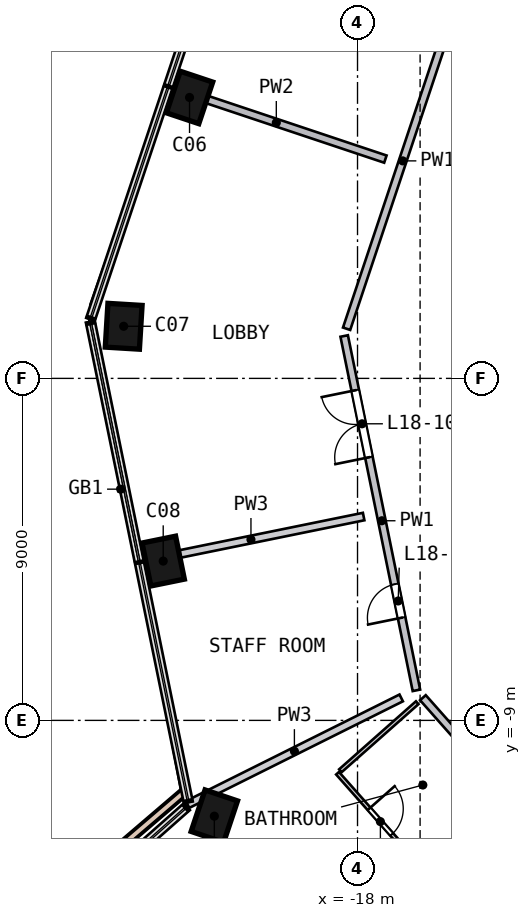
"""IFC4 building model, lengths in metres.
Left out: names, types, materials, properties, quantities, classifications, styles, units other than length and angle.
Written with IfcOpenShell. Run it as: python <this file> out.ifc"""

import sys

from ifc_helpers import new_model, si_unit, direction, frame, frame_2d, origin, origin_2d, place, context, subcontext, project, spatial, rectangle, extrude, element, fill, save


model = new_model("IFC4")
c1 = context("Model", 3, precision=1e-05, world=origin(), true_north=direction((0.0, 1.0)))
c2 = subcontext(c1, "Body", "Model", "MODEL_VIEW")
j1 = project(units=[si_unit("LENGTHUNIT", "METRE"), si_unit("PLANEANGLEUNIT", "RADIAN")], contexts=[c1])
p1 = place(None, origin())
s1 = spatial("IfcSite", under=j1, at=p1, CompositionType="ELEMENT")
p2 = place(p1, origin())
s2 = spatial("IfcBuilding", under=s1, at=p2, CompositionType="ELEMENT")
p3 = place(p2, frame((0.0, 0.0, 81.0)))
s3 = spatial("IfcBuildingStorey", under=s2, at=p3, CompositionType="ELEMENT", Elevation=81.0)
p4 = place(p3, frame((-22.391, 7.483, 0.0), z_axis=(-0.024338376, -0.074987109, 0.996887444), x_axis=(-0.31573538, -0.945566595, -0.07883517)))
e1 = element("IfcColumn", 1, at=p4, inside=s3, PredefinedType="COLUMN", context=c2, shape_type="SweptSolid", body=[
    extrude(rectangle(XDim=1.15, YDim=0.9, at=origin_2d()), origin(), (0.0, 0.0, 1.0), 4.705),
])
p5 = place(p3, frame((-24.148, 1.469, 0.0), z_axis=(-0.00420277, -0.080682803, 0.996730968), x_axis=(0.060241647, 0.994909055, 0.080789336)))
e2 = element("IfcColumn", 2, at=p5, inside=s3, PredefinedType="COLUMN", context=c2, shape_type="SweptSolid", body=[
    extrude(rectangle(XDim=1.15, YDim=0.9, at=origin_2d()), origin(), (0.0, 0.0, 1.0), 4.705),
])
p6 = place(p3, frame((-23.133, -4.715, 0.0), z_axis=(0.016398563, -0.077114764, 0.996887356), x_axis=(0.19912584, -0.976797696, -0.078836291)))
e3 = element("IfcColumn", 3, at=p6, inside=s3, PredefinedType="COLUMN", context=c2, shape_type="SweptSolid", body=[
    extrude(rectangle(XDim=1.15, YDim=0.9, at=origin_2d()), origin(), (0.0, 0.0, 1.0), 4.705),
])
p7 = place(p3, frame((-21.814, -11.433, 0.0), z_axis=(0.038806098, -0.072527974, 0.996611148), x_axis=(0.319522533, 0.94589897, 0.056395831)))
e4 = element("IfcColumn", 4, at=p7, inside=s3, PredefinedType="COLUMN", context=c2, shape_type="SweptSolid", body=[
    extrude(rectangle(XDim=1.15, YDim=0.9, at=origin_2d()), origin(), (0.0, 0.0, 1.0), 4.706),
])
p8 = place(p3, frame((-22.553, -10.879, 0.0), z_axis=(0.0, 0.0, 1.0), x_axis=(-0.759731275, -0.65023718, 0.0)))
e5 = element("IfcWall", 5, at=p8, inside=s3, PredefinedType="PARAPET", context=c2, shape_type="SweptSolid", body=[
    extrude(rectangle(XDim=8.419, YDim=0.2, at=frame_2d((4.21, 0.0))), origin(), (0.0, 0.0, 1.0), 1.1),
])
p9 = place(p3, frame((-29.293, -24.465, 0.0), z_axis=(0.0, 0.0, 1.0), x_axis=(0.74872671, 0.662878808, 0.0)))
e6 = element("IfcWall", 6, at=p9, inside=s3, PredefinedType="SOLIDWALL", context=c2, shape_type="SweptSolid", body=[
    extrude(rectangle(XDim=20.191, YDim=0.2, at=frame_2d((10.096, 0.0))), origin(), (0.0, 0.0, 1.0), 4.69),
])
p10 = place(p9, frame((11.65, 0.0, 0.0)))
e7 = element("IfcOpeningElement", 7, at=p10, cuts=e6, PredefinedType="OPENING", context=c2, shape_type="SweptSolid", body=[
    extrude(rectangle(XDim=1.0, YDim=2.1, at=frame_2d((0.5, 1.05))), frame((0.0, 0.11, 0.0), z_axis=(0.0, -1.0, 0.0), x_axis=(1.0, 0.0, 0.0)), (0.0, 0.0, 1.0), 0.22),
])
p11 = place(p3, frame((-16.45, -8.209, 0.0), z_axis=(0.0, 0.0, 1.0), x_axis=(-0.199726278, 0.979851731, 0.0)))
e8 = element("IfcWall", 8, at=p11, inside=s3, PredefinedType="SOLIDWALL", context=c2, shape_type="SweptSolid", body=[
    extrude(rectangle(XDim=9.516, YDim=0.2, at=frame_2d((4.758, 0.0))), origin(), (0.0, 0.0, 1.0), 4.69),
])
p12 = place(p11, frame((6.258, 0.0, 0.0)))
e9 = element("IfcOpeningElement", 9, at=p12, cuts=e8, PredefinedType="OPENING", context=c2, shape_type="SweptSolid", body=[
    extrude(rectangle(XDim=1.8, YDim=2.1, at=frame_2d((0.9, 1.05))), frame((0.0, 0.11, 0.0), z_axis=(0.0, -1.0, 0.0), x_axis=(1.0, 0.0, 0.0)), (0.0, 0.0, 1.0), 0.22),
])
p13 = place(p11, frame((1.95, 0.0, 0.0)))
e10 = element("IfcOpeningElement", 10, at=p13, cuts=e8, PredefinedType="OPENING", context=c2, shape_type="SweptSolid", body=[
    extrude(rectangle(XDim=0.9, YDim=2.1, at=frame_2d((0.45, 1.05))), frame((0.0, 0.11, 0.0), z_axis=(0.0, -1.0, 0.0), x_axis=(1.0, 0.0, 0.0)), (0.0, 0.0, 1.0), 0.22),
])
p14 = place(p3, frame((-15.334, 10.141, 0.0), z_axis=(0.0, 0.0, 1.0), x_axis=(-0.316982448, -0.948431404, 0.0)))
e11 = element("IfcWall", 11, at=p14, inside=s3, PredefinedType="SOLIDWALL", context=c2, shape_type="SweptSolid", body=[
    extrude(rectangle(XDim=9.316, YDim=0.2, at=frame_2d((4.658, 0.0))), origin(), (0.0, 0.0, 1.0), 4.69),
])
p15 = place(p3, frame((-16.279, -8.402, 0.0), z_axis=(0.0, 0.0, 1.0), x_axis=(0.66286047, -0.748742945, 0.0)))
e12 = element("IfcWall", 12, at=p15, inside=s3, PredefinedType="SOLIDWALL", context=c2, shape_type="SweptSolid", body=[
    extrude(rectangle(XDim=3.4, YDim=0.2, at=frame_2d((1.7, 0.0))), origin(), (0.0, 0.0, 1.0), 4.69),
])
p16 = place(p3, frame((-17.267, 5.771, 0.0), z_axis=(0.0, 0.0, 1.0), x_axis=(-0.948436957, 0.316965832, 0.0)))
e13 = element("IfcWall", 13, at=p16, inside=s3, PredefinedType="SOLIDWALL", context=c2, shape_type="SweptSolid", body=[
    extrude(rectangle(XDim=6.052, YDim=0.2, at=frame_2d((3.026, 0.0))), origin(), (0.0, 0.0, 1.0), 4.69),
])
p17 = place(p3, frame((-18.525, -10.391, 0.0), z_axis=(0.0, 0.0, 1.0), x_axis=(0.662847106, -0.748754776, 0.0)))
e14 = element("IfcWall", 14, at=p17, inside=s3, PredefinedType="PARTITIONING", context=c2, shape_type="SweptSolid", body=[
    extrude(rectangle(XDim=3.2, YDim=0.1, at=frame_2d((1.6, 0.0))), origin(), (0.0, 0.0, 1.0), 4.69),
])
p18 = place(p17, frame((1.25, 0.0, 0.0)))
e15 = element("IfcOpeningElement", 15, at=p18, cuts=e14, PredefinedType="OPENING", context=c2, shape_type="SweptSolid", body=[
    extrude(rectangle(XDim=0.9, YDim=2.1, at=frame_2d((0.45, 1.05))), frame((0.0, 0.06, 0.0), z_axis=(0.0, -1.0, 0.0), x_axis=(1.0, 0.0, 0.0)), (0.0, 0.0, 1.0), 0.12),
])
p19 = place(p3, frame((-18.45, -10.325, 0.0), z_axis=(0.0, 0.0, 1.0), x_axis=(0.748749719, 0.662852818, 0.0)))
e16 = element("IfcWall", 16, at=p19, inside=s3, PredefinedType="PARTITIONING", context=c2, shape_type="SweptSolid", body=[
    extrude(rectangle(XDim=2.7, YDim=0.1, at=frame_2d((1.35, 0.0))), origin(), (0.0, 0.0, 1.0), 4.69),
])
p20 = place(p3, frame((-17.839, -3.636, 0.0), z_axis=(0.0, 0.0, 1.0), x_axis=(-0.979855797, -0.199706325, 0.0)))
e17 = element("IfcWall", 17, at=p20, inside=s3, PredefinedType="SOLIDWALL", context=c2, shape_type="SweptSolid", body=[
    extrude(rectangle(XDim=6.052, YDim=0.2, at=frame_2d((3.026, 0.0))), origin(), (0.0, 0.0, 1.0), 4.69),
])
p21 = place(p3, frame((-16.851, -8.409, 0.0), z_axis=(0.0, 0.0, 1.0), x_axis=(-0.894776698, -0.446513898, 0.0)))
e18 = element("IfcWall", 18, at=p21, inside=s3, PredefinedType="SOLIDWALL", context=c2, shape_type="SweptSolid", body=[
    extrude(rectangle(XDim=6.282, YDim=0.2, at=frame_2d((3.141, 0.0))), origin(), (0.0, 0.0, 1.0), 4.69),
])
p22 = place(p12, origin())
e19 = element("IfcDoor", 19, at=p22, inside=s3, OperationType="DOUBLE_DOOR_SINGLE_SWING", PredefinedType="DOOR", context=c2, shape_type="SweptSolid", body=[
    extrude(rectangle(XDim=1.8, YDim=2.1, at=frame_2d((0.9, 1.05))), frame((0.0, 0.025, 0.0), z_axis=(0.0, -1.0, 0.0), x_axis=(1.0, 0.0, 0.0)), (0.0, 0.0, 1.0), 0.05),
])
fill(e9, e19)
p23 = place(p13, origin())
e20 = element("IfcDoor", 20, at=p23, inside=s3, OperationType="SINGLE_SWING_LEFT", PredefinedType="DOOR", context=c2, shape_type="SweptSolid", body=[
    extrude(rectangle(XDim=0.9, YDim=2.1, at=frame_2d((0.45, 1.05))), frame((0.0, 0.025, 0.0), z_axis=(0.0, -1.0, 0.0), x_axis=(1.0, 0.0, 0.0)), (0.0, 0.0, 1.0), 0.05),
])
fill(e10, e20)
p24 = place(p18, origin())
e21 = element("IfcDoor", 21, at=p24, inside=s3, OperationType="SINGLE_SWING_LEFT", PredefinedType="DOOR", context=c2, shape_type="SweptSolid", body=[
    extrude(rectangle(XDim=0.9, YDim=2.1, at=frame_2d((0.45, 1.05))), frame((0.0, 0.025, 0.0), z_axis=(0.0, -1.0, 0.0), x_axis=(1.0, 0.0, 0.0)), (0.0, 0.0, 1.0), 0.05),
])
fill(e15, e21)
save(model, sys.argv[1])
